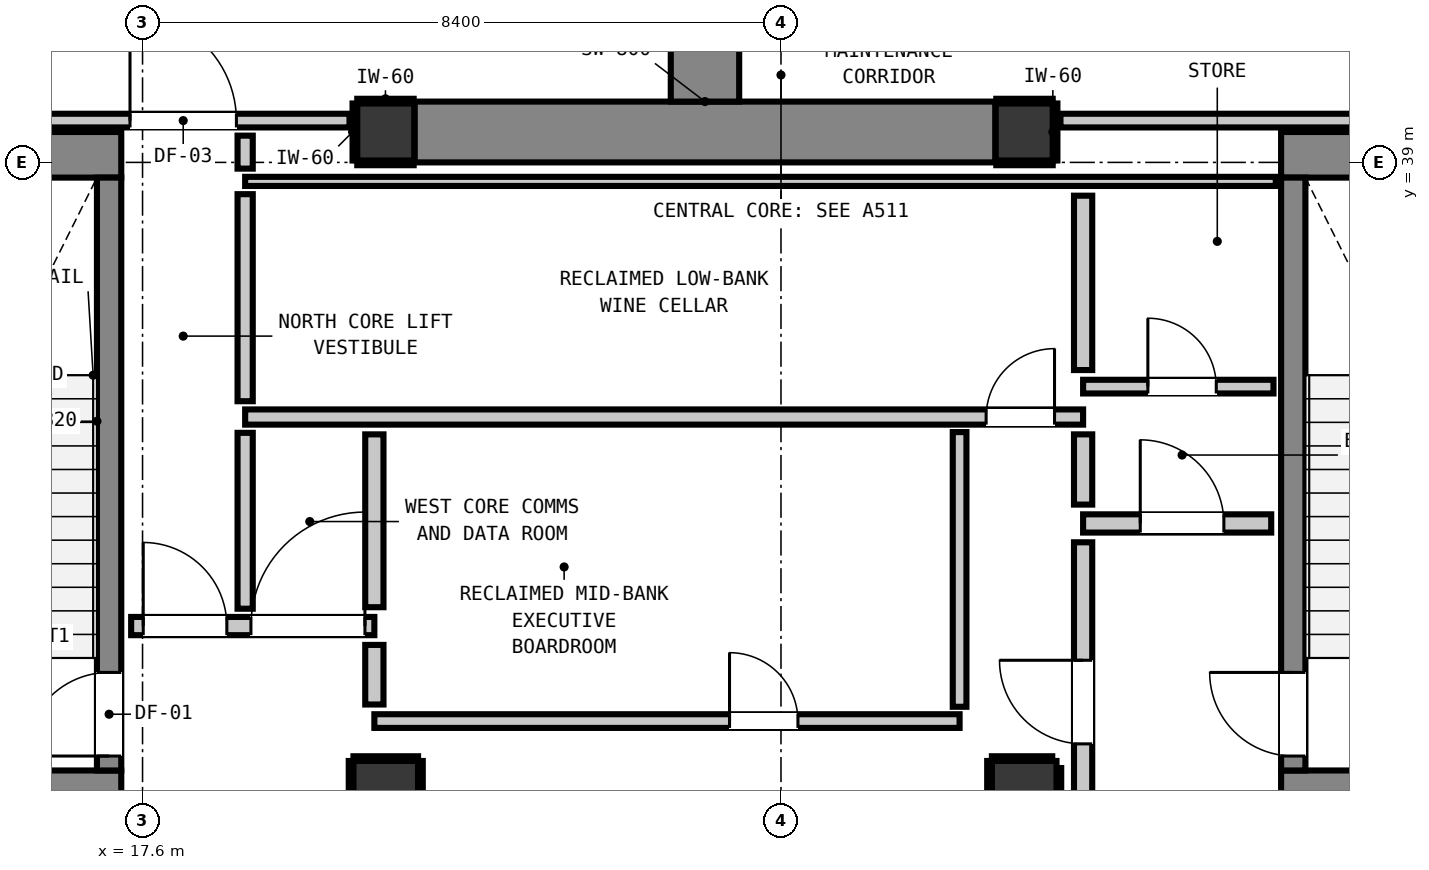
"""IFC4 building model, lengths in metres.
Left out: names, types, materials, properties, quantities, classifications, styles, units other than length and angle.
Written with IfcOpenShell. Run it as: python <this file> out.ifc"""

import sys

from ifc_helpers import new_model, si_unit, direction, frame, frame_2d, origin, origin_2d, place, context, subcontext, project, spatial, rectangle, extrude, element, fill, save


model = new_model("IFC4")
c1 = context("Model", 3, precision=1e-05, world=origin(), true_north=direction((0.0, 1.0)))
c2 = subcontext(c1, "Body", "Model", "MODEL_VIEW")
j1 = project(units=[si_unit("LENGTHUNIT", "METRE"), si_unit("PLANEANGLEUNIT", "RADIAN")], contexts=[c1])
p1 = place(None, origin())
s1 = spatial("IfcSite", under=j1, at=p1, CompositionType="ELEMENT")
p2 = place(p1, origin())
s2 = spatial("IfcBuilding", under=s1, at=p2, CompositionType="ELEMENT")
p3 = place(p2, frame((0.0, 0.0, 257.84)))
s3 = spatial("IfcBuildingStorey", under=s2, at=p3, CompositionType="ELEMENT", Elevation=257.84)
for number, where, z_axis, x_axis in (
    (1, (20.8, 39.4, 0.0), (0.0, 0.0, 1.0), (1.0, 0.0, 0.0)),
    (2, (29.2, 39.4, 0.0), (0.0, 0.0, 1.0), (1.0, 0.0, 0.0)),
):
    element("IfcColumn", number, at=place(p3, frame(where, z_axis=z_axis, x_axis=x_axis)), inside=s3, PredefinedType="COLUMN", context=c2, shape_type="SweptSolid", body=[
        extrude(rectangle(XDim=0.75, YDim=0.75, at=origin_2d()), origin(), (0.0, 0.0, 1.0), 4.4),
    ])
p4 = place(p3, frame((13.24, 39.1, 0.0), z_axis=(0.0, 0.0, 1.0), x_axis=(1.0, 0.0, 0.0)))
e3 = element("IfcWall", 3, at=p4, inside=s3, PredefinedType="SHEAR", context=c2, shape_type="SweptSolid", body=[
    extrude(rectangle(XDim=4.08, YDim=0.6, at=frame_2d((2.04, 0.0))), origin(), (0.0, 0.0, 1.0), 4.4),
])
p5 = place(p3, frame((13.78, 30.7, 0.0), z_axis=(0.0, 0.0, 1.0), x_axis=(1.0, 0.0, 0.0)))
e4 = element("IfcWall", 4, at=p5, inside=s3, PredefinedType="SHEAR", context=c2, shape_type="SweptSolid", body=[
    extrude(rectangle(XDim=3.54, YDim=0.6, at=frame_2d((1.77, 0.0))), origin(), (0.0, 0.0, 1.0), 4.4),
])
p6 = place(p3, frame((32.58, 39.1, 0.0), z_axis=(0.0, 0.0, 1.0), x_axis=(1.0, 0.0, 0.0)))
e5 = element("IfcWall", 5, at=p6, inside=s3, PredefinedType="SHEAR", context=c2, shape_type="SweptSolid", body=[
    extrude(rectangle(XDim=4.08, YDim=0.6, at=frame_2d((2.04, 0.0))), origin(), (0.0, 0.0, 1.0), 4.4),
])
p7 = place(p3, frame((32.58, 30.7, 0.0), z_axis=(0.0, 0.0, 1.0), x_axis=(1.0, 0.0, 0.0)))
e6 = element("IfcWall", 6, at=p7, inside=s3, PredefinedType="SHEAR", context=c2, shape_type="SweptSolid", body=[
    extrude(rectangle(XDim=3.54, YDim=0.6, at=frame_2d((1.77, 0.0))), origin(), (0.0, 0.0, 1.0), 4.4),
])
p8 = place(p3, frame((21.18, 39.4, 0.0), z_axis=(0.0, 0.0, 1.0), x_axis=(1.0, 0.0, 0.0)))
e7 = element("IfcWall", 7, at=p8, inside=s3, PredefinedType="SHEAR", context=c2, shape_type="SweptSolid", body=[
    extrude(rectangle(XDim=7.64, YDim=0.8, at=frame_2d((3.82, 0.0))), origin(), (0.0, 0.0, 1.0), 4.4),
])
p9 = place(p3, frame((17.16, 31.0, 0.0), z_axis=(0.0, 0.0, 1.0), x_axis=(0.0, 1.0, 0.0)))
e8 = element("IfcWall", 8, at=p9, inside=s3, PredefinedType="SHEAR", context=c2, shape_type="SweptSolid", body=[
    extrude(rectangle(XDim=7.8, YDim=0.32, at=frame_2d((3.9, 0.0))), origin(), (0.0, 0.0, 1.0), 4.4),
])
p10 = place(p9, frame((0.19, 0.0, 0.0)))
e9 = element("IfcOpeningElement", 9, at=p10, cuts=e8, PredefinedType="OPENING", context=c2, shape_type="SweptSolid", body=[
    extrude(rectangle(XDim=1.1, YDim=2.15, at=frame_2d((0.55, 1.075))), frame((0.0, 0.17, 0.0), z_axis=(0.0, -1.0, 0.0), x_axis=(1.0, 0.0, 0.0)), (0.0, 0.0, 1.0), 0.34),
])
p11 = place(p3, frame((32.74, 31.0, 0.0), z_axis=(0.0, 0.0, 1.0), x_axis=(0.0, 1.0, 0.0)))
e10 = element("IfcWall", 10, at=p11, inside=s3, PredefinedType="SHEAR", context=c2, shape_type="SweptSolid", body=[
    extrude(rectangle(XDim=7.8, YDim=0.32, at=frame_2d((3.9, 0.0))), origin(), (0.0, 0.0, 1.0), 4.4),
])
p12 = place(p11, frame((0.19, 0.0, 0.0)))
e11 = element("IfcOpeningElement", 11, at=p12, cuts=e10, PredefinedType="OPENING", context=c2, shape_type="SweptSolid", body=[
    extrude(rectangle(XDim=1.1, YDim=2.15, at=frame_2d((0.55, 1.075))), frame((0.0, 0.17, 0.0), z_axis=(0.0, -1.0, 0.0), x_axis=(1.0, 0.0, 0.0)), (0.0, 0.0, 1.0), 0.34),
])
for number, where, z_axis, x_axis in (
    (12, (20.8, 30.7, 0.0), (0.0, 0.0, 1.0), (1.0, 0.0, 0.0)),
    (13, (29.2, 30.7, 0.0), (0.0, 0.0, 1.0), (1.0, 0.0, 0.0)),
):
    element("IfcColumn", number, at=place(p3, frame(where, z_axis=z_axis, x_axis=x_axis)), inside=s3, PredefinedType="COLUMN", context=c2, shape_type="SweptSolid", body=[
        extrude(rectangle(XDim=0.85, YDim=0.85, at=origin_2d()), origin(), (0.0, 0.0, 1.0), 4.4),
    ])
p13 = place(p3, frame((25.0, 39.8, 0.0), z_axis=(0.0, 0.0, 1.0), x_axis=(0.0, 1.0, 0.0)))
e14 = element("IfcWall", 14, at=p13, inside=s3, PredefinedType="SHEAR", context=c2, shape_type="SweptSolid", body=[
    extrude(rectangle(XDim=10.125, YDim=0.9, at=frame_2d((5.062, 0.0))), origin(), (0.0, 0.0, 1.0), 4.18),
])
p14 = place(p3, frame((17.45, 32.9, 0.0), z_axis=(0.0, 0.0, 1.0), x_axis=(1.0, 0.0, 0.0)))
e15 = element("IfcWall", 15, at=p14, inside=s3, PredefinedType="PARTITIONING", context=c2, shape_type="SweptSolid", body=[
    extrude(rectangle(XDim=3.2, YDim=0.24, at=frame_2d((1.6, 0.0))), origin(), (0.0, 0.0, 1.0), 4.18),
])
p15 = place(p14, frame((0.159, 0.0, 0.0)))
e16 = element("IfcOpeningElement", 16, at=p15, cuts=e15, PredefinedType="OPENING", context=c2, shape_type="SweptSolid", body=[
    extrude(rectangle(XDim=1.1, YDim=2.15, at=frame_2d((0.55, 1.075))), frame((0.0, 0.13, 0.0), z_axis=(0.0, -1.0, 0.0), x_axis=(1.0, 0.0, 0.0)), (0.0, 0.0, 1.0), 0.26),
])
p16 = place(p14, frame((1.576, 0.0, 0.0)))
e17 = element("IfcOpeningElement", 17, at=p16, cuts=e15, PredefinedType="OPENING", context=c2, shape_type="SweptSolid", body=[
    extrude(rectangle(XDim=1.5, YDim=2.15, at=frame_2d((0.75, 1.075))), frame((0.0, 0.13, 0.0), z_axis=(0.0, -1.0, 0.0), x_axis=(1.0, 0.0, 0.0)), (0.0, 0.0, 1.0), 0.26),
])
p17 = place(p3, frame((29.975, 34.25, 0.0), z_axis=(0.0, 0.0, 1.0), x_axis=(1.0, 0.0, 0.0)))
e18 = element("IfcWall", 18, at=p17, inside=s3, PredefinedType="PARTITIONING", context=c2, shape_type="SweptSolid", body=[
    extrude(rectangle(XDim=2.475, YDim=0.24, at=frame_2d((1.237, 0.0))), origin(), (0.0, 0.0, 1.0), 4.18),
])
p18 = place(p17, frame((0.752, 0.0, 0.0)))
e19 = element("IfcOpeningElement", 19, at=p18, cuts=e18, PredefinedType="OPENING", context=c2, shape_type="SweptSolid", body=[
    extrude(rectangle(XDim=1.1, YDim=2.15, at=frame_2d((0.55, 1.075))), frame((0.0, 0.13, 0.0), z_axis=(0.0, -1.0, 0.0), x_axis=(1.0, 0.0, 0.0)), (0.0, 0.0, 1.0), 0.26),
])
p19 = place(p3, frame((18.95, 35.65, 0.0), z_axis=(0.0, 0.0, 1.0), x_axis=(1.0, 0.0, 0.0)))
e20 = element("IfcWall", 20, at=p19, inside=s3, PredefinedType="PARTITIONING", context=c2, shape_type="SweptSolid", body=[
    extrude(rectangle(XDim=11.025, YDim=0.2, at=frame_2d((5.513, 0.0))), origin(), (0.0, 0.0, 1.0), 4.18),
])
p20 = place(p19, frame((9.749, 0.0, 0.0)))
e21 = element("IfcOpeningElement", 21, at=p20, cuts=e20, PredefinedType="OPENING", context=c2, shape_type="SweptSolid", body=[
    extrude(rectangle(XDim=0.9, YDim=2.1, at=frame_2d((0.45, 1.05))), frame((0.0, 0.11, 0.0), z_axis=(0.0, -1.0, 0.0), x_axis=(1.0, 0.0, 0.0)), (0.0, 0.0, 1.0), 0.22),
])
p21 = place(p3, frame((20.65, 31.65, 0.0), z_axis=(0.0, 0.0, 1.0), x_axis=(1.0, 0.0, 0.0)))
e22 = element("IfcWall", 22, at=p21, inside=s3, PredefinedType="PARTITIONING", context=c2, shape_type="SweptSolid", body=[
    extrude(rectangle(XDim=7.7, YDim=0.18, at=frame_2d((3.85, 0.0))), origin(), (0.0, 0.0, 1.0), 4.18),
])
p22 = place(p21, frame((4.673, 0.0, 0.0)))
e23 = element("IfcOpeningElement", 23, at=p22, cuts=e22, PredefinedType="OPENING", context=c2, shape_type="SweptSolid", body=[
    extrude(rectangle(XDim=0.9, YDim=2.1, at=frame_2d((0.45, 1.05))), frame((0.0, 0.1, 0.0), z_axis=(0.0, -1.0, 0.0), x_axis=(1.0, 0.0, 0.0)), (0.0, 0.0, 1.0), 0.2),
])
p23 = place(p3, frame((29.975, 36.05, 0.0), z_axis=(0.0, 0.0, 1.0), x_axis=(1.0, 0.0, 0.0)))
e24 = element("IfcWall", 24, at=p23, inside=s3, PredefinedType="PARTITIONING", context=c2, shape_type="SweptSolid", body=[
    extrude(rectangle(XDim=2.505, YDim=0.18, at=frame_2d((1.252, 0.0))), origin(), (0.0, 0.0, 1.0), 4.18),
])
p24 = place(p23, frame((0.852, 0.0, 0.0)))
e25 = element("IfcOpeningElement", 25, at=p24, cuts=e24, PredefinedType="OPENING", context=c2, shape_type="SweptSolid", body=[
    extrude(rectangle(XDim=0.9, YDim=2.1, at=frame_2d((0.45, 1.05))), frame((0.0, 0.1, 0.0), z_axis=(0.0, -1.0, 0.0), x_axis=(1.0, 0.0, 0.0)), (0.0, 0.0, 1.0), 0.2),
])
p25 = place(p3, frame((10.8, 39.55, 0.0), z_axis=(0.0, 0.0, 1.0), x_axis=(1.0, 0.0, 0.0)))
e26 = element("IfcWall", 26, at=p25, inside=s3, PredefinedType="PARTITIONING", context=c2, shape_type="SweptSolid", body=[
    extrude(rectangle(XDim=9.523, YDim=0.18, at=frame_2d((4.761, 0.0))), origin(), (0.0, 0.0, 1.0), 3.807),
])
p26 = place(p25, frame((6.635, 0.0, 0.0)))
e27 = element("IfcOpeningElement", 27, at=p26, cuts=e26, PredefinedType="OPENING", context=c2, shape_type="SweptSolid", body=[
    extrude(rectangle(XDim=1.4, YDim=2.15, at=frame_2d((0.7, 1.075))), frame((0.0, 0.1, 0.0), z_axis=(0.0, -1.0, 0.0), x_axis=(1.0, 0.0, 0.0)), (0.0, 0.0, 1.0), 0.2),
])
p27 = place(p25, frame((0.199, 0.0, 0.0)))
e28 = element("IfcOpeningElement", 28, at=p27, cuts=e26, PredefinedType="OPENING", context=c2, shape_type="SweptSolid", body=[
    extrude(rectangle(XDim=1.4, YDim=2.15, at=frame_2d((0.7, 1.075))), frame((0.0, 0.1, 0.0), z_axis=(0.0, -1.0, 0.0), x_axis=(1.0, 0.0, 0.0)), (0.0, 0.0, 1.0), 0.2),
])
p28 = place(p3, frame((29.677, 39.55, 0.0), z_axis=(0.0, 0.0, 1.0), x_axis=(1.0, 0.0, 0.0)))
e29 = element("IfcWall", 29, at=p28, inside=s3, PredefinedType="PARTITIONING", context=c2, shape_type="SweptSolid", body=[
    extrude(rectangle(XDim=9.423, YDim=0.18, at=frame_2d((4.711, 0.0))), origin(), (0.0, 0.0, 1.0), 3.807),
])
p29 = place(p28, frame((7.824, 0.0, 0.0)))
e30 = element("IfcOpeningElement", 30, at=p29, cuts=e29, PredefinedType="OPENING", context=c2, shape_type="SweptSolid", body=[
    extrude(rectangle(XDim=1.4, YDim=2.15, at=frame_2d((0.7, 1.075))), frame((0.0, 0.1, 0.0), z_axis=(0.0, -1.0, 0.0), x_axis=(1.0, 0.0, 0.0)), (0.0, 0.0, 1.0), 0.2),
])
p30 = place(p3, frame((18.95, 38.75, 0.0), z_axis=(0.0, 0.0, 1.0), x_axis=(1.0, 0.0, 0.0)))
e31 = element("IfcWall", 31, at=p30, inside=s3, PredefinedType="PARTITIONING", context=c2, shape_type="SweptSolid", body=[
    extrude(rectangle(XDim=13.56, YDim=0.12, at=frame_2d((6.78, 0.0))), origin(), (0.0, 0.0, 1.0), 4.18),
])
p31 = place(p3, frame((20.65, 31.868, 0.0), z_axis=(0.0, 0.0, 1.0), x_axis=(0.0, 1.0, 0.0)))
e32 = element("IfcWall", 32, at=p31, inside=s3, PredefinedType="PARTITIONING", context=c2, shape_type="SweptSolid", body=[
    extrude(rectangle(XDim=0.784, YDim=0.24, at=frame_2d((0.392, 0.0))), origin(), (0.0, 0.0, 1.0), 3.415),
])
p32 = place(p3, frame((20.65, 33.148, 0.0), z_axis=(0.0, 0.0, 1.0), x_axis=(0.0, 1.0, 0.0)))
e33 = element("IfcWall", 33, at=p32, inside=s3, PredefinedType="PARTITIONING", context=c2, shape_type="SweptSolid", body=[
    extrude(rectangle(XDim=2.274, YDim=0.24, at=frame_2d((1.137, 0.0))), origin(), (0.0, 0.0, 1.0), 3.415),
])
p33 = place(p3, frame((29.975, 29.768, 0.0), z_axis=(0.0, 0.0, 1.0), x_axis=(0.0, 1.0, 0.0)))
e34 = element("IfcWall", 34, at=p33, inside=s3, PredefinedType="PARTITIONING", context=c2, shape_type="SweptSolid", body=[
    extrude(rectangle(XDim=4.234, YDim=0.24, at=frame_2d((2.117, 0.0))), origin(), (0.0, 0.0, 1.0), 4.18),
])
p34 = place(p33, frame((1.582, 0.0, 0.0)))
e35 = element("IfcOpeningElement", 35, at=p34, cuts=e34, PredefinedType="OPENING", context=c2, shape_type="SweptSolid", body=[
    extrude(rectangle(XDim=1.1, YDim=2.15, at=frame_2d((0.55, 1.075))), frame((0.0, 0.13, 0.0), z_axis=(0.0, -1.0, 0.0), x_axis=(1.0, 0.0, 0.0)), (0.0, 0.0, 1.0), 0.26),
])
p35 = place(p3, frame((29.975, 34.498, 0.0), z_axis=(0.0, 0.0, 1.0), x_axis=(0.0, 1.0, 0.0)))
e36 = element("IfcWall", 36, at=p35, inside=s3, PredefinedType="PARTITIONING", context=c2, shape_type="SweptSolid", body=[
    extrude(rectangle(XDim=0.924, YDim=0.24, at=frame_2d((0.462, 0.0))), origin(), (0.0, 0.0, 1.0), 4.18),
])
p36 = place(p3, frame((29.975, 36.268, 0.0), z_axis=(0.0, 0.0, 1.0), x_axis=(0.0, 1.0, 0.0)))
e37 = element("IfcWall", 37, at=p36, inside=s3, PredefinedType="PARTITIONING", context=c2, shape_type="SweptSolid", body=[
    extrude(rectangle(XDim=2.294, YDim=0.24, at=frame_2d((1.147, 0.0))), origin(), (0.0, 0.0, 1.0), 4.18),
])
p37 = place(p3, frame((18.95, 33.128, 0.0), z_axis=(0.0, 0.0, 1.0), x_axis=(0.0, 1.0, 0.0)))
e38 = element("IfcWall", 38, at=p37, inside=s3, PredefinedType="PARTITIONING", context=c2, shape_type="SweptSolid", body=[
    extrude(rectangle(XDim=2.314, YDim=0.2, at=frame_2d((1.157, 0.0))), origin(), (0.0, 0.0, 1.0), 4.18),
])
p38 = place(p3, frame((18.95, 35.858, 0.0), z_axis=(0.0, 0.0, 1.0), x_axis=(0.0, 1.0, 0.0)))
e39 = element("IfcWall", 39, at=p38, inside=s3, PredefinedType="PARTITIONING", context=c2, shape_type="SweptSolid", body=[
    extrude(rectangle(XDim=2.724, YDim=0.2, at=frame_2d((1.362, 0.0))), origin(), (0.0, 0.0, 1.0), 4.18),
])
p39 = place(p3, frame((18.95, 38.918, 0.0), z_axis=(0.0, 0.0, 1.0), x_axis=(0.0, 1.0, 0.0)))
e40 = element("IfcWall", 40, at=p39, inside=s3, PredefinedType="PARTITIONING", context=c2, shape_type="SweptSolid", body=[
    extrude(rectangle(XDim=0.434, YDim=0.2, at=frame_2d((0.217, 0.0))), origin(), (0.0, 0.0, 1.0), 4.18),
])
p40 = place(p3, frame((28.35, 31.838, 0.0), z_axis=(0.0, 0.0, 1.0), x_axis=(0.0, 1.0, 0.0)))
e41 = element("IfcWall", 41, at=p40, inside=s3, PredefinedType="PARTITIONING", context=c2, shape_type="SweptSolid", body=[
    extrude(rectangle(XDim=3.614, YDim=0.18, at=frame_2d((1.807, 0.0))), origin(), (0.0, 0.0, 1.0), 4.18),
])
for number, where, z_axis, x_axis in (
    (42, (20.425, 38.993, 0.0), (0.0, 0.0, 1.0), (1.0, 0.0, 0.0)),
    (43, (20.425, 39.807, 0.0), (0.0, 0.0, 1.0), (1.0, 0.0, 0.0)),
):
    element("IfcWall", number, at=place(p3, frame(where, z_axis=z_axis, x_axis=x_axis)), inside=s3, PredefinedType="PARTITIONING", context=c2, shape_type="SweptSolid", body=[
        extrude(rectangle(XDim=0.742, YDim=0.06, at=frame_2d((0.371, 0.0))), origin(), (0.0, 0.0, 1.0), 1.45),
    ])
p41 = place(p3, frame((20.393, 39.025, 0.0), z_axis=(0.0, 0.0, 1.0), x_axis=(0.0, 1.0, 0.0)))
e44 = element("IfcWall", 44, at=p41, inside=s3, PredefinedType="PARTITIONING", context=c2, shape_type="SweptSolid", body=[
    extrude(rectangle(XDim=0.75, YDim=0.06, at=frame_2d((0.375, 0.0))), origin(), (0.0, 0.0, 1.0), 1.45),
])
for number, where, z_axis, x_axis in (
    (45, (28.833, 38.993, 0.0), (0.0, 0.0, 1.0), (1.0, 0.0, 0.0)),
    (46, (28.833, 39.807, 0.0), (0.0, 0.0, 1.0), (1.0, 0.0, 0.0)),
):
    element("IfcWall", number, at=place(p3, frame(where, z_axis=z_axis, x_axis=x_axis)), inside=s3, PredefinedType="PARTITIONING", context=c2, shape_type="SweptSolid", body=[
        extrude(rectangle(XDim=0.742, YDim=0.06, at=frame_2d((0.371, 0.0))), origin(), (0.0, 0.0, 1.0), 1.45),
    ])
p42 = place(p3, frame((29.607, 39.025, 0.0), z_axis=(0.0, 0.0, 1.0), x_axis=(0.0, 1.0, 0.0)))
e47 = element("IfcWall", 47, at=p42, inside=s3, PredefinedType="PARTITIONING", context=c2, shape_type="SweptSolid", body=[
    extrude(rectangle(XDim=0.75, YDim=0.06, at=frame_2d((0.375, 0.0))), origin(), (0.0, 0.0, 1.0), 1.45),
])
for number, where, z_axis, x_axis in (
    (48, (20.375, 31.157, 0.0), (0.0, 0.0, 1.0), (1.0, 0.0, 0.0)),
    (49, (20.343, 30.275, 0.0), (0.0, 0.0, 1.0), (0.0, 1.0, 0.0)),
    (50, (21.257, 30.275, 0.0), (0.0, 0.0, 1.0), (0.0, 1.0, 0.0)),
):
    element("IfcWall", number, at=place(p3, frame(where, z_axis=z_axis, x_axis=x_axis)), inside=s3, PredefinedType="PARTITIONING", context=c2, shape_type="SweptSolid", body=[
        extrude(rectangle(XDim=0.85, YDim=0.06, at=frame_2d((0.425, 0.0))), origin(), (0.0, 0.0, 1.0), 1.45),
    ])
p43 = place(p3, frame((28.775, 31.157, 0.0), z_axis=(0.0, 0.0, 1.0), x_axis=(1.0, 0.0, 0.0)))
e51 = element("IfcWall", 51, at=p43, inside=s3, PredefinedType="PARTITIONING", context=c2, shape_type="SweptSolid", body=[
    extrude(rectangle(XDim=0.794, YDim=0.06, at=frame_2d((0.397, 0.0))), origin(), (0.0, 0.0, 1.0), 1.45),
])
p44 = place(p3, frame((28.743, 30.275, 0.0), z_axis=(0.0, 0.0, 1.0), x_axis=(0.0, 1.0, 0.0)))
e52 = element("IfcWall", 52, at=p44, inside=s3, PredefinedType="PARTITIONING", context=c2, shape_type="SweptSolid", body=[
    extrude(rectangle(XDim=0.85, YDim=0.06, at=frame_2d((0.425, 0.0))), origin(), (0.0, 0.0, 1.0), 1.45),
])
p45 = place(p3, frame((29.657, 30.275, 0.0), z_axis=(0.0, 0.0, 1.0), x_axis=(0.0, 1.0, 0.0)))
e53 = element("IfcWall", 53, at=p45, inside=s3, PredefinedType="PARTITIONING", context=c2, shape_type="SweptSolid", body=[
    extrude(rectangle(XDim=0.757, YDim=0.06, at=frame_2d((0.378, 0.0))), origin(), (0.0, 0.0, 1.0), 1.45),
])
p46 = place(p10, origin())
e54 = element("IfcDoor", 54, at=p46, inside=s3, OperationType="SINGLE_SWING_LEFT", PredefinedType="DOOR", context=c2, shape_type="SweptSolid", body=[
    extrude(rectangle(XDim=1.1, YDim=2.15, at=frame_2d((0.55, 1.075))), frame((0.0, 0.025, 0.0), z_axis=(0.0, -1.0, 0.0), x_axis=(1.0, 0.0, 0.0)), (0.0, 0.0, 1.0), 0.05),
])
fill(e9, e54)
p47 = place(p12, origin())
e55 = element("IfcDoor", 55, at=p47, inside=s3, OperationType="SINGLE_SWING_RIGHT", PredefinedType="DOOR", context=c2, shape_type="SweptSolid", body=[
    extrude(rectangle(XDim=1.1, YDim=2.15, at=frame_2d((0.55, 1.075))), frame((0.0, 0.025, 0.0), z_axis=(0.0, -1.0, 0.0), x_axis=(1.0, 0.0, 0.0)), (0.0, 0.0, 1.0), 0.05),
])
fill(e11, e55)
p48 = place(p15, origin())
e56 = element("IfcDoor", 56, at=p48, inside=s3, OperationType="SINGLE_SWING_LEFT", PredefinedType="DOOR", context=c2, shape_type="SweptSolid", body=[
    extrude(rectangle(XDim=1.1, YDim=2.15, at=frame_2d((0.55, 1.075))), frame((0.0, 0.025, 0.0), z_axis=(0.0, -1.0, 0.0), x_axis=(1.0, 0.0, 0.0)), (0.0, 0.0, 1.0), 0.05),
])
fill(e16, e56)
p49 = place(p34, origin())
e57 = element("IfcDoor", 57, at=p49, inside=s3, OperationType="SINGLE_SWING_RIGHT", PredefinedType="DOOR", context=c2, shape_type="SweptSolid", body=[
    extrude(rectangle(XDim=1.1, YDim=2.15, at=frame_2d((0.55, 1.075))), frame((0.0, 0.025, 0.0), z_axis=(0.0, -1.0, 0.0), x_axis=(1.0, 0.0, 0.0)), (0.0, 0.0, 1.0), 0.05),
])
fill(e35, e57)
p50 = place(p18, origin())
e58 = element("IfcDoor", 58, at=p50, inside=s3, OperationType="SINGLE_SWING_LEFT", PredefinedType="DOOR", context=c2, shape_type="SweptSolid", body=[
    extrude(rectangle(XDim=1.1, YDim=2.15, at=frame_2d((0.55, 1.075))), frame((0.0, 0.025, 0.0), z_axis=(0.0, -1.0, 0.0), x_axis=(1.0, 0.0, 0.0)), (0.0, 0.0, 1.0), 0.05),
])
fill(e19, e58)
p51 = place(p26, origin())
e59 = element("IfcDoor", 59, at=p51, inside=s3, OperationType="SINGLE_SWING_LEFT", PredefinedType="DOOR", context=c2, shape_type="SweptSolid", body=[
    extrude(rectangle(XDim=1.4, YDim=2.15, at=frame_2d((0.7, 1.075))), frame((0.0, 0.025, 0.0), z_axis=(0.0, -1.0, 0.0), x_axis=(1.0, 0.0, 0.0)), (0.0, 0.0, 1.0), 0.05),
])
fill(e27, e59)
p52 = place(p16, origin())
e60 = element("IfcDoor", 60, at=p52, inside=s3, OperationType="SINGLE_SWING_RIGHT", PredefinedType="DOOR", context=c2, shape_type="SweptSolid", body=[
    extrude(rectangle(XDim=1.5, YDim=2.15, at=frame_2d((0.75, 1.075))), frame((0.0, 0.025, 0.0), z_axis=(0.0, -1.0, 0.0), x_axis=(1.0, 0.0, 0.0)), (0.0, 0.0, 1.0), 0.05),
])
fill(e17, e60)
p53 = place(p24, origin())
e61 = element("IfcDoor", 61, at=p53, inside=s3, OperationType="SINGLE_SWING_LEFT", PredefinedType="DOOR", context=c2, shape_type="SweptSolid", body=[
    extrude(rectangle(XDim=0.9, YDim=2.1, at=frame_2d((0.45, 1.05))), frame((0.0, 0.025, 0.0), z_axis=(0.0, -1.0, 0.0), x_axis=(1.0, 0.0, 0.0)), (0.0, 0.0, 1.0), 0.05),
])
fill(e25, e61)
p54 = place(p20, origin())
e62 = element("IfcDoor", 62, at=p54, inside=s3, OperationType="SINGLE_SWING_RIGHT", PredefinedType="DOOR", context=c2, shape_type="SweptSolid", body=[
    extrude(rectangle(XDim=0.9, YDim=2.1, at=frame_2d((0.45, 1.05))), frame((0.0, 0.025, 0.0), z_axis=(0.0, -1.0, 0.0), x_axis=(1.0, 0.0, 0.0)), (0.0, 0.0, 1.0), 0.05),
])
fill(e21, e62)
p55 = place(p22, origin())
e63 = element("IfcDoor", 63, at=p55, inside=s3, OperationType="SINGLE_SWING_LEFT", PredefinedType="DOOR", context=c2, shape_type="SweptSolid", body=[
    extrude(rectangle(XDim=0.9, YDim=2.1, at=frame_2d((0.45, 1.05))), frame((0.0, 0.025, 0.0), z_axis=(0.0, -1.0, 0.0), x_axis=(1.0, 0.0, 0.0)), (0.0, 0.0, 1.0), 0.05),
])
fill(e23, e63)
save(model, sys.argv[1])
